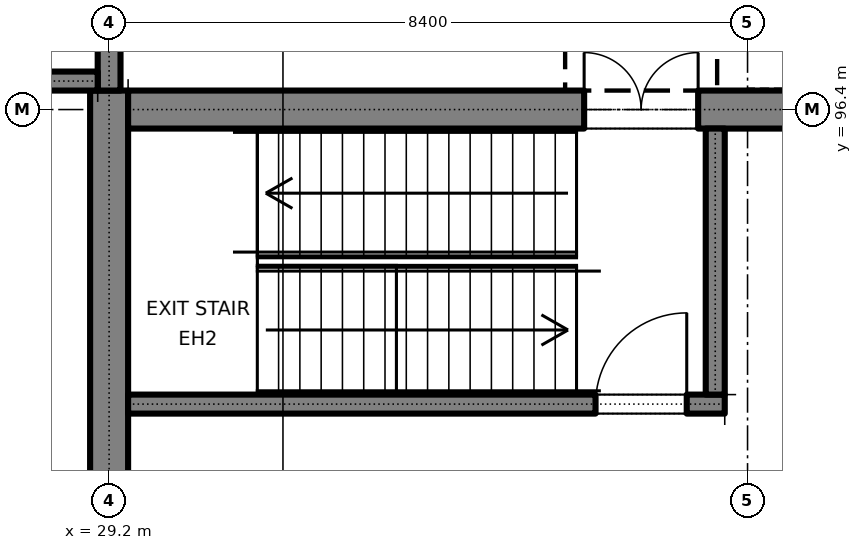
"""IFC4 building model, lengths in metres.
Left out: names, types, materials, properties, quantities, classifications, styles, units other than length and angle.
Written with IfcOpenShell. Run it as: python <this file> out.ifc"""

import sys

from ifc_helpers import new_model, si_unit, direction, frame, frame_2d, origin, place, context, subcontext, project, spatial, rectangle, extrude, element, fill, save


model = new_model("IFC4")
c1 = context("Model", 3, precision=1e-05, world=origin(), true_north=direction((0.0, 1.0)))
c2 = subcontext(c1, "Body", "Model", "MODEL_VIEW")
j1 = project(units=[si_unit("LENGTHUNIT", "METRE"), si_unit("PLANEANGLEUNIT", "RADIAN")], contexts=[c1])
p1 = place(None, origin())
s1 = spatial("IfcSite", under=j1, at=p1, CompositionType="ELEMENT")
p2 = place(p1, origin())
s2 = spatial("IfcBuilding", under=s1, at=p2, CompositionType="ELEMENT")
p3 = place(p2, origin())
s3 = spatial("IfcBuildingStorey", under=s2, at=p3, CompositionType="ELEMENT", Elevation=0.0)
p4 = place(p3, frame((29.2, 54.15, 0.0), z_axis=(0.0, 0.0, 1.0), x_axis=(0.0, 1.0, 0.0)))
e1 = element("IfcWall", 1, at=p4, inside=s3, PredefinedType="SOLIDWALL", context=c2, shape_type="SweptSolid", body=[
    extrude(rectangle(XDim=42.5, YDim=0.5, at=frame_2d((21.25, 0.0))), origin(), (0.0, 0.0, 1.0), 5.4),
])
p5 = place(p4, frame((7.75, 0.0, 0.0)))
e2 = element("IfcOpeningElement", 2, at=p5, cuts=e1, PredefinedType="OPENING", context=c2, shape_type="SweptSolid", body=[
    extrude(rectangle(XDim=1.8, YDim=2.1, at=frame_2d((0.9, 1.05))), frame((0.0, 0.26, 0.0), z_axis=(0.0, -1.0, 0.0), x_axis=(1.0, 0.0, 0.0)), (0.0, 0.0, 1.0), 0.52),
])
p6 = place(p4, frame((20.35, 0.0, 0.0)))
e3 = element("IfcOpeningElement", 3, at=p6, cuts=e1, PredefinedType="OPENING", context=c2, shape_type="SweptSolid", body=[
    extrude(rectangle(XDim=1.8, YDim=2.1, at=frame_2d((0.9, 1.05))), frame((0.0, 0.26, 0.0), z_axis=(0.0, -1.0, 0.0), x_axis=(1.0, 0.0, 0.0)), (0.0, 0.0, 1.0), 0.52),
])
p7 = place(p4, frame((32.95, 0.0, 0.0)))
e4 = element("IfcOpeningElement", 4, at=p7, cuts=e1, PredefinedType="OPENING", context=c2, shape_type="SweptSolid", body=[
    extrude(rectangle(XDim=1.8, YDim=2.1, at=frame_2d((0.9, 1.05))), frame((0.0, 0.26, 0.0), z_axis=(0.0, -1.0, 0.0), x_axis=(1.0, 0.0, 0.0)), (0.0, 0.0, 1.0), 0.52),
])
p8 = place(p3, frame((29.45, 96.4, 0.0), z_axis=(0.0, 0.0, 1.0), x_axis=(1.0, 0.0, 0.0)))
e5 = element("IfcWall", 5, at=p8, inside=s3, PredefinedType="SOLIDWALL", context=c2, shape_type="SweptSolid", body=[
    extrude(rectangle(XDim=66.7, YDim=0.5, at=frame_2d((33.35, 0.0))), origin(), (0.0, 0.0, 1.0), 5.4),
])
p9 = place(p8, frame((11.75, 0.0, 0.9)))
e6 = element("IfcOpeningElement", 6, at=p9, cuts=e5, PredefinedType="OPENING", context=c2, shape_type="SweptSolid", body=[
    extrude(rectangle(XDim=1.2, YDim=3.6, at=frame_2d((0.6, 1.8))), frame((0.0, 0.26, 0.0), z_axis=(0.0, -1.0, 0.0), x_axis=(1.0, 0.0, 0.0)), (0.0, 0.0, 1.0), 0.52),
])
p10 = place(p8, frame((20.15, 0.0, 0.9)))
e7 = element("IfcOpeningElement", 7, at=p10, cuts=e5, PredefinedType="OPENING", context=c2, shape_type="SweptSolid", body=[
    extrude(rectangle(XDim=1.2, YDim=3.6, at=frame_2d((0.6, 1.8))), frame((0.0, 0.26, 0.0), z_axis=(0.0, -1.0, 0.0), x_axis=(1.0, 0.0, 0.0)), (0.0, 0.0, 1.0), 0.52),
])
p11 = place(p8, frame((28.55, 0.0, 0.9)))
e8 = element("IfcOpeningElement", 8, at=p11, cuts=e5, PredefinedType="OPENING", context=c2, shape_type="SweptSolid", body=[
    extrude(rectangle(XDim=1.2, YDim=3.6, at=frame_2d((0.6, 1.8))), frame((0.0, 0.26, 0.0), z_axis=(0.0, -1.0, 0.0), x_axis=(1.0, 0.0, 0.0)), (0.0, 0.0, 1.0), 0.52),
])
p12 = place(p8, frame((36.95, 0.0, 0.9)))
e9 = element("IfcOpeningElement", 9, at=p12, cuts=e5, PredefinedType="OPENING", context=c2, shape_type="SweptSolid", body=[
    extrude(rectangle(XDim=1.2, YDim=3.6, at=frame_2d((0.6, 1.8))), frame((0.0, 0.26, 0.0), z_axis=(0.0, -1.0, 0.0), x_axis=(1.0, 0.0, 0.0)), (0.0, 0.0, 1.0), 0.52),
])
p13 = place(p8, frame((45.35, 0.0, 0.9)))
e10 = element("IfcOpeningElement", 10, at=p13, cuts=e5, PredefinedType="OPENING", context=c2, shape_type="SweptSolid", body=[
    extrude(rectangle(XDim=1.2, YDim=3.6, at=frame_2d((0.6, 1.8))), frame((0.0, 0.26, 0.0), z_axis=(0.0, -1.0, 0.0), x_axis=(1.0, 0.0, 0.0)), (0.0, 0.0, 1.0), 0.52),
])
p14 = place(p8, frame((53.75, 0.0, 0.9)))
e11 = element("IfcOpeningElement", 11, at=p14, cuts=e5, PredefinedType="OPENING", context=c2, shape_type="SweptSolid", body=[
    extrude(rectangle(XDim=1.2, YDim=3.6, at=frame_2d((0.6, 1.8))), frame((0.0, 0.26, 0.0), z_axis=(0.0, -1.0, 0.0), x_axis=(1.0, 0.0, 0.0)), (0.0, 0.0, 1.0), 0.52),
])
p15 = place(p8, frame((6.0, 0.0, 0.0)))
e12 = element("IfcOpeningElement", 12, at=p15, cuts=e5, PredefinedType="OPENING", context=c2, shape_type="SweptSolid", body=[
    extrude(rectangle(XDim=1.5, YDim=2.1, at=frame_2d((0.75, 1.05))), frame((0.0, 0.26, 0.0), z_axis=(0.0, -1.0, 0.0), x_axis=(1.0, 0.0, 0.0)), (0.0, 0.0, 1.0), 0.52),
])
p16 = place(p8, frame((65.1, 0.0, 0.0)))
e13 = element("IfcOpeningElement", 13, at=p16, cuts=e5, PredefinedType="OPENING", context=c2, shape_type="SweptSolid", body=[
    extrude(rectangle(XDim=1.5, YDim=2.1, at=frame_2d((0.75, 1.05))), frame((0.0, 0.26, 0.0), z_axis=(0.0, -1.0, 0.0), x_axis=(1.0, 0.0, 0.0)), (0.0, 0.0, 1.0), 0.52),
])
p17 = place(p3, frame((29.45, 92.525, 0.0), z_axis=(0.0, 0.0, 1.0), x_axis=(1.0, 0.0, 0.0)))
e14 = element("IfcWall", 14, at=p17, inside=s3, PredefinedType="SOLIDWALL", context=c2, shape_type="SweptSolid", body=[
    extrude(rectangle(XDim=7.85, YDim=0.25, at=frame_2d((3.925, 0.0))), origin(), (0.0, 0.0, 1.0), 5.4),
])
p18 = place(p17, frame((6.15, 0.0, 0.0)))
e15 = element("IfcOpeningElement", 15, at=p18, cuts=e14, PredefinedType="OPENING", context=c2, shape_type="SweptSolid", body=[
    extrude(rectangle(XDim=1.2, YDim=2.1, at=frame_2d((0.6, 1.05))), frame((0.0, 0.135, 0.0), z_axis=(0.0, -1.0, 0.0), x_axis=(1.0, 0.0, 0.0)), (0.0, 0.0, 1.0), 0.27),
])
p19 = place(p3, frame((37.175, 92.65, 0.0), z_axis=(0.0, 0.0, 1.0), x_axis=(0.0, 1.0, 0.0)))
e16 = element("IfcWall", 16, at=p19, inside=s3, PredefinedType="SOLIDWALL", context=c2, shape_type="SweptSolid", body=[
    extrude(rectangle(XDim=3.5, YDim=0.25, at=frame_2d((1.75, 0.0))), origin(), (0.0, 0.0, 1.0), 5.4),
])
p20 = place(p3, frame((29.2, 54.17, -0.3), z_axis=(0.0, 0.0, 1.0), x_axis=(0.0, 1.0, 0.0)))
e17 = element("IfcWall", 17, at=p20, inside=s3, PredefinedType="SOLIDWALL", context=c2, shape_type="SweptSolid", body=[
    extrude(rectangle(XDim=42.46, YDim=0.5, at=frame_2d((21.23, 0.0))), origin(), (0.0, 0.0, 1.0), 0.3),
])
p21 = place(p3, frame((29.45, 96.4, -0.5), z_axis=(0.0, 0.0, 1.0), x_axis=(1.0, 0.0, 0.0)))
e18 = element("IfcWall", 18, at=p21, inside=s3, PredefinedType="SOLIDWALL", context=c2, shape_type="SweptSolid", body=[
    extrude(rectangle(XDim=66.7, YDim=0.5, at=frame_2d((33.35, 0.0))), origin(), (0.0, 0.0, 1.0), 0.5),
])
p22 = place(p3, frame((29.45, 92.525, -0.5), z_axis=(0.0, 0.0, 1.0), x_axis=(1.0, 0.0, 0.0)))
e19 = element("IfcWall", 19, at=p22, inside=s3, PredefinedType="SOLIDWALL", context=c2, shape_type="SweptSolid", body=[
    extrude(rectangle(XDim=7.83, YDim=0.25, at=frame_2d((3.915, 0.0))), origin(), (0.0, 0.0, 1.0), 0.5),
])
p23 = place(p3, frame((37.175, 92.65, -0.5), z_axis=(0.0, 0.0, 1.0), x_axis=(0.0, 1.0, 0.0)))
e20 = element("IfcWall", 20, at=p23, inside=s3, PredefinedType="SOLIDWALL", context=c2, shape_type="SweptSolid", body=[
    extrude(rectangle(XDim=0.695, YDim=0.25, at=frame_2d((0.348, 0.0))), origin(), (0.0, 0.0, 1.0), 0.5),
])
p24 = place(p3, frame((37.175, 93.345, -0.5), z_axis=(0.0, 0.0, 1.0), x_axis=(0.0, 1.0, 0.0)))
e21 = element("IfcWall", 21, at=p24, inside=s3, PredefinedType="SOLIDWALL", context=c2, shape_type="SweptSolid", body=[
    extrude(rectangle(XDim=2.805, YDim=0.25, at=frame_2d((1.402, 0.0))), origin(), (0.0, 0.0, 1.0), 0.5),
])
p25 = place(p3, frame((29.2, 96.65, 0.0), z_axis=(0.0, 0.0, 1.0), x_axis=(0.0, 1.0, 0.0)))
e22 = element("IfcWall", 22, at=p25, inside=s3, PredefinedType="SOLIDWALL", context=c2, shape_type="SweptSolid", body=[
    extrude(rectangle(XDim=7.963, YDim=0.3, at=frame_2d((3.982, 0.0))), origin(), (0.0, 0.0, 1.0), 5.4),
])
p26 = place(p25, frame((0.55, 0.0, 0.0)))
e23 = element("IfcOpeningElement", 23, at=p26, cuts=e22, PredefinedType="OPENING", context=c2, shape_type="SweptSolid", body=[
    extrude(rectangle(XDim=1.1, YDim=2.1, at=frame_2d((0.55, 1.05))), frame((0.0, 0.16, 0.0), z_axis=(0.0, -1.0, 0.0), x_axis=(1.0, 0.0, 0.0)), (0.0, 0.0, 1.0), 0.32),
])
p27 = place(p3, frame((25.8, 96.775, 0.0), z_axis=(0.0, 0.0, 1.0), x_axis=(1.0, 0.0, 0.0)))
e24 = element("IfcWall", 24, at=p27, inside=s3, PredefinedType="SHEAR", context=c2, shape_type="SweptSolid", body=[
    extrude(rectangle(XDim=3.25, YDim=0.25, at=frame_2d((1.625, 0.0))), origin(), (0.0, 0.0, 1.0), 5.4),
])
p28 = place(p3, frame((29.2, 96.67, -0.2), z_axis=(0.0, 0.0, 1.0), x_axis=(0.0, 1.0, 0.0)))
e25 = element("IfcWall", 25, at=p28, inside=s3, PredefinedType="SOLIDWALL", context=c2, shape_type="SweptSolid", body=[
    extrude(rectangle(XDim=0.51, YDim=0.3, at=frame_2d((0.255, 0.0))), origin(), (0.0, 0.0, 1.0), 0.2),
])
p29 = place(p18, origin())
e26 = element("IfcDoor", 26, at=p29, inside=s3, OperationType="SINGLE_SWING_RIGHT", PredefinedType="DOOR", context=c2, shape_type="SweptSolid", body=[
    extrude(rectangle(XDim=1.2, YDim=2.1, at=frame_2d((0.6, 1.05))), frame((0.0, 0.025, 0.0), z_axis=(0.0, -1.0, 0.0), x_axis=(1.0, 0.0, 0.0)), (0.0, 0.0, 1.0), 0.05),
])
fill(e15, e26)
p30 = place(p15, origin())
e27 = element("IfcDoor", 27, at=p30, inside=s3, OperationType="DOUBLE_DOOR_SINGLE_SWING", PredefinedType="DOOR", context=c2, shape_type="SweptSolid", body=[
    extrude(rectangle(XDim=1.5, YDim=2.1, at=frame_2d((0.75, 1.05))), frame((0.0, 0.025, 0.0), z_axis=(0.0, -1.0, 0.0), x_axis=(1.0, 0.0, 0.0)), (0.0, 0.0, 1.0), 0.05),
])
fill(e12, e27)
save(model, sys.argv[1])
